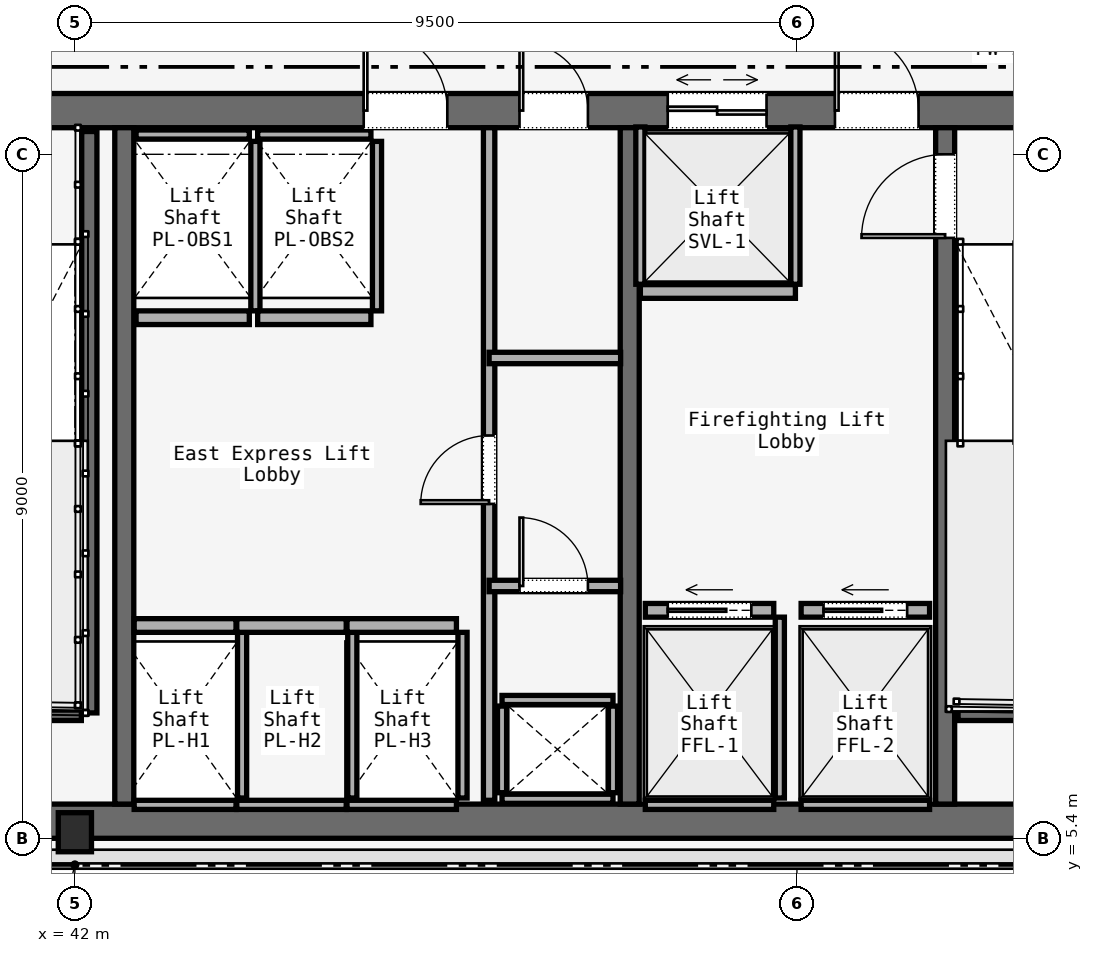
"""IFC4 building model, lengths in metres.
Left out: names, types, materials, properties, quantities, classifications, styles, units other than length and angle.
Written with IfcOpenShell. Run it as: python <this file> out.ifc"""

import sys

from ifc_helpers import new_model, si_unit, direction, frame, frame_2d, origin, origin_2d, place, context, subcontext, project, spatial, rectangle, i_section, extrude, element, fill, save


model = new_model("IFC4")
c1 = context("Model", 3, precision=1e-05, world=origin(), true_north=direction((0.0, 1.0)))
c2 = subcontext(c1, "Body", "Model", "MODEL_VIEW")
j1 = project(units=[si_unit("LENGTHUNIT", "METRE"), si_unit("PLANEANGLEUNIT", "RADIAN")], contexts=[c1])
p1 = place(None, origin())
s1 = spatial("IfcSite", under=j1, at=p1, CompositionType="ELEMENT")
p2 = place(p1, origin())
s2 = spatial("IfcBuilding", under=s1, at=p2, CompositionType="ELEMENT")
p3 = place(p2, frame((0.0, 0.0, 70.2)))
s3 = spatial("IfcBuildingStorey", under=s2, at=p3, CompositionType="ELEMENT", Elevation=70.2)
p4 = place(p3, frame((26.45, 14.975, 0.0), z_axis=(0.0, 0.0, 1.0), x_axis=(1.0, 0.0, 0.0)))
e1 = element("IfcWall", 1, at=p4, inside=s3, PredefinedType="SOLIDWALL", context=c2, shape_type="SweptSolid", body=[
    extrude(rectangle(XDim=31.1, YDim=0.45, at=frame_2d((15.55, 0.0))), origin(), (0.0, 0.0, 1.0), 3.58),
])
p5 = place(p4, frame((1.65, 0.0, 0.0)))
e2 = element("IfcOpeningElement", 2, at=p5, cuts=e1, PredefinedType="OPENING", context=c2, shape_type="SweptSolid", body=[
    extrude(rectangle(XDim=1.1, YDim=2.2, at=frame_2d((0.55, 1.1))), frame((0.0, 0.225, 0.0), z_axis=(0.0, -1.0, 0.0), x_axis=(1.0, 0.0, 0.0)), (0.0, 0.0, 1.0), 0.45),
])
p6 = place(p4, frame((13.65, 0.0, 0.0)))
e3 = element("IfcOpeningElement", 3, at=p6, cuts=e1, PredefinedType="OPENING", context=c2, shape_type="SweptSolid", body=[
    extrude(rectangle(XDim=1.1, YDim=2.2, at=frame_2d((0.55, 1.1))), frame((0.0, 0.225, 0.0), z_axis=(0.0, -1.0, 0.0), x_axis=(1.0, 0.0, 0.0)), (0.0, 0.0, 1.0), 0.45),
])
p7 = place(p4, frame((25.55, 0.0, 0.0)))
e4 = element("IfcOpeningElement", 4, at=p7, cuts=e1, PredefinedType="OPENING", context=c2, shape_type="SweptSolid", body=[
    extrude(rectangle(XDim=1.1, YDim=2.2, at=frame_2d((0.55, 1.1))), frame((0.0, 0.225, 0.0), z_axis=(0.0, -1.0, 0.0), x_axis=(1.0, 0.0, 0.0)), (0.0, 0.0, 1.0), 0.45),
])
p8 = place(p4, frame((10.7, 0.0, 0.0)))
e5 = element("IfcOpeningElement", 5, at=p8, cuts=e1, PredefinedType="OPENING", context=c2, shape_type="SweptSolid", body=[
    extrude(rectangle(XDim=1.4, YDim=2.2, at=frame_2d((0.7, 1.1))), frame((0.0, 0.225, 0.0), z_axis=(0.0, -1.0, 0.0), x_axis=(1.0, 0.0, 0.0)), (0.0, 0.0, 1.0), 0.45),
])
p9 = place(p4, frame((19.35, 0.0, 0.0)))
e6 = element("IfcOpeningElement", 6, at=p9, cuts=e1, PredefinedType="OPENING", context=c2, shape_type="SweptSolid", body=[
    extrude(rectangle(XDim=1.1, YDim=2.2, at=frame_2d((0.55, 1.1))), frame((0.0, 0.225, 0.0), z_axis=(0.0, -1.0, 0.0), x_axis=(1.0, 0.0, 0.0)), (0.0, 0.0, 1.0), 0.45),
])
p10 = place(p4, frame((21.4, 0.0, 0.0)))
e7 = element("IfcOpeningElement", 7, at=p10, cuts=e1, PredefinedType="OPENING", context=c2, shape_type="SweptSolid", body=[
    extrude(rectangle(XDim=0.9, YDim=2.1, at=frame_2d((0.45, 1.05))), frame((0.0, 0.225, 0.0), z_axis=(0.0, -1.0, 0.0), x_axis=(1.0, 0.0, 0.0)), (0.0, 0.0, 1.0), 0.45),
])
p11 = place(p4, frame((23.35, 0.0, 0.0)))
e8 = element("IfcOpeningElement", 8, at=p11, cuts=e1, PredefinedType="OPENING", context=c2, shape_type="SweptSolid", body=[
    extrude(rectangle(XDim=1.3, YDim=2.3, at=frame_2d((0.65, 1.15))), frame((0.0, 0.225, 0.0), z_axis=(0.0, -1.0, 0.0), x_axis=(1.0, 0.0, 0.0)), (0.0, 0.0, 1.0), 0.45),
])
p12 = place(p3, frame((26.45, 5.625, 0.0), z_axis=(0.0, 0.0, 1.0), x_axis=(1.0, 0.0, 0.0)))
e9 = element("IfcWall", 9, at=p12, inside=s3, PredefinedType="SOLIDWALL", context=c2, shape_type="SweptSolid", body=[
    extrude(rectangle(XDim=31.1, YDim=0.45, at=frame_2d((15.55, 0.0))), origin(), (0.0, 0.0, 1.0), 3.58),
])
for number, where, z_axis, x_axis in (
    (10, (42.65, 5.85, 0.0), (0.0, 0.0, 1.0), (0.0, 1.0, 0.0)),
    (11, (49.3, 5.85, 0.0), (0.0, 0.0, 1.0), (0.0, 1.0, 0.0)),
):
    element("IfcWall", number, at=place(p3, frame(where, z_axis=z_axis, x_axis=x_axis)), inside=s3, PredefinedType="SOLIDWALL", context=c2, shape_type="SweptSolid", body=[
        extrude(rectangle(XDim=8.9, YDim=0.25, at=frame_2d((4.45, 0.0))), origin(), (0.0, 0.0, 1.0), 3.58),
    ])
p13 = place(p3, frame((53.45, 5.85, 0.0), z_axis=(0.0, 0.0, 1.0), x_axis=(0.0, 1.0, 0.0)))
e12 = element("IfcWall", 12, at=p13, inside=s3, PredefinedType="SOLIDWALL", context=c2, shape_type="SweptSolid", body=[
    extrude(rectangle(XDim=8.9, YDim=0.25, at=frame_2d((4.45, 0.0))), origin(), (0.0, 0.0, 1.0), 3.58),
])
p14 = place(p13, frame((7.45, 0.0, 0.0)))
e13 = element("IfcOpeningElement", 13, at=p14, cuts=e12, PredefinedType="OPENING", context=c2, shape_type="SweptSolid", body=[
    extrude(rectangle(XDim=1.1, YDim=2.2, at=frame_2d((0.55, 1.1))), frame((0.0, 0.125, 0.0), z_axis=(0.0, -1.0, 0.0), x_axis=(1.0, 0.0, 0.0)), (0.0, 0.0, 1.0), 0.25),
])
p15 = place(p3, frame((42.0, 5.48, 0.0), z_axis=(0.0, 0.0, 1.0), x_axis=(1.0, 0.0, 0.0)))
e14 = element("IfcColumn", 14, at=p15, inside=s3, PredefinedType="COLUMN", context=c2, shape_type="SweptSolid", body=[
    extrude(i_section(OverallWidth=0.437, OverallDepth=0.514, WebThickness=0.061, FlangeThickness=0.077, FilletRadius=0.015, at=origin_2d()), origin(), (0.0, 0.0, 1.0), 3.58),
])
p16 = place(p3, frame((42.19, 14.7, 0.0), z_axis=(0.0, 0.0, 1.0), x_axis=(0.0, -1.0, 0.0)))
e15 = element("IfcWall", 15, at=p16, inside=s3, PredefinedType="SOLIDWALL", context=c2, shape_type="SweptSolid", body=[
    extrude(rectangle(XDim=7.65, YDim=0.2, at=frame_2d((3.825, 0.0))), origin(), (0.0, 0.0, 1.0), 3.8),
])
for number, where, z_axis, x_axis in (
    (16, (38.97, 7.05, 0.0), (0.0, 0.0, 1.0), (1.0, 0.0, 0.0)),
    (17, (53.62, 7.05, 0.0), (0.0, 0.0, 1.0), (1.0, 0.0, 0.0)),
):
    element("IfcWall", number, at=place(p3, frame(where, z_axis=z_axis, x_axis=x_axis)), inside=s3, PredefinedType="SOLIDWALL", context=c2, shape_type="SweptSolid", body=[
        extrude(rectangle(XDim=3.115, YDim=0.2, at=frame_2d((1.558, 0.0))), origin(), (0.0, 0.0, 1.0), 3.8),
    ])
for number, where, z_axis, x_axis in (
    (18, (47.62, 5.92, 0.0), (0.0, 0.0, 1.0), (1.0, 0.0, 0.0)),
    (19, (47.62, 7.22, 0.0), (0.0, 0.0, 1.0), (1.0, 0.0, 0.0)),
):
    element("IfcWall", number, at=place(p3, frame(where, z_axis=z_axis, x_axis=x_axis)), inside=s3, PredefinedType="SOLIDWALL", context=c2, shape_type="SweptSolid", body=[
        extrude(rectangle(XDim=1.46, YDim=0.12, at=frame_2d((0.73, 0.0))), origin(), (0.0, 0.0, 1.0), 2.95),
    ])
for number, where, z_axis, x_axis in (
    (20, (47.62, 6.0, 0.0), (0.0, 0.0, 1.0), (0.0, 1.0, 0.0)),
    (21, (49.08, 6.0, 0.0), (0.0, 0.0, 1.0), (0.0, 1.0, 0.0)),
):
    element("IfcWall", number, at=place(p3, frame(where, z_axis=z_axis, x_axis=x_axis)), inside=s3, PredefinedType="SOLIDWALL", context=c2, shape_type="SweptSolid", body=[
        extrude(rectangle(XDim=1.14, YDim=0.12, at=frame_2d((0.57, 0.0))), origin(), (0.0, 0.0, 1.0), 2.95),
    ])
p17 = place(p3, frame((47.45, 5.9, 0.0), z_axis=(0.0, 0.0, 1.0), x_axis=(0.0, 1.0, 0.0)))
e22 = element("IfcWall", 22, at=p17, inside=s3, PredefinedType="PARTITIONING", context=c2, shape_type="SweptSolid", body=[
    extrude(rectangle(XDim=8.85, YDim=0.15, at=frame_2d((4.425, 0.0))), origin(), (0.0, 0.0, 1.0), 2.95),
])
p18 = place(p17, frame((3.9, 0.0, 0.0)))
e23 = element("IfcOpeningElement", 23, at=p18, cuts=e22, PredefinedType="OPENING", context=c2, shape_type="SweptSolid", body=[
    extrude(rectangle(XDim=0.9, YDim=2.1, at=frame_2d((0.45, 1.05))), frame((0.0, 0.075, 0.0), z_axis=(0.0, -1.0, 0.0), x_axis=(1.0, 0.0, 0.0)), (0.0, 0.0, 1.0), 0.15),
])
p19 = place(p3, frame((47.45, 8.72, 0.0), z_axis=(0.0, 0.0, 1.0), x_axis=(1.0, 0.0, 0.0)))
e24 = element("IfcWall", 24, at=p19, inside=s3, PredefinedType="PARTITIONING", context=c2, shape_type="SweptSolid", body=[
    extrude(rectangle(XDim=1.73, YDim=0.15, at=frame_2d((0.865, 0.0))), origin(), (0.0, 0.0, 1.0), 2.95),
])
p20 = place(p19, frame((0.4, 0.0, 0.0)))
e25 = element("IfcOpeningElement", 25, at=p20, cuts=e24, PredefinedType="OPENING", context=c2, shape_type="SweptSolid", body=[
    extrude(rectangle(XDim=0.9, YDim=2.1, at=frame_2d((0.45, 1.05))), frame((0.0, 0.075, 0.0), z_axis=(0.0, -1.0, 0.0), x_axis=(1.0, 0.0, 0.0)), (0.0, 0.0, 1.0), 0.15),
])
p21 = place(p3, frame((47.45, 11.72, 0.0), z_axis=(0.0, 0.0, 1.0), x_axis=(1.0, 0.0, 0.0)))
e26 = element("IfcWall", 26, at=p21, inside=s3, PredefinedType="PARTITIONING", context=c2, shape_type="SweptSolid", body=[
    extrude(rectangle(XDim=1.73, YDim=0.15, at=frame_2d((0.865, 0.0))), origin(), (0.0, 0.0, 1.0), 2.95),
])
p22 = place(p3, frame((42.78, 8.2, 0.0), z_axis=(0.0, 0.0, 1.0), x_axis=(1.0, 0.0, 0.0)))
e27 = element("IfcWall", 27, at=p22, inside=s3, PredefinedType="SOLIDWALL", context=c2, shape_type="SweptSolid", body=[
    extrude(rectangle(XDim=1.34, YDim=0.18, at=frame_2d((0.67, 0.0))), origin(), (0.0, 0.0, 1.0), 2.95),
])
p23 = place(p3, frame((42.78, 5.84, 0.0), z_axis=(0.0, 0.0, 1.0), x_axis=(1.0, 0.0, 0.0)))
e28 = element("IfcWall", 28, at=p23, inside=s3, PredefinedType="SOLIDWALL", context=c2, shape_type="SweptSolid", body=[
    extrude(rectangle(XDim=1.34, YDim=0.12, at=frame_2d((0.67, 0.0))), origin(), (0.0, 0.0, 1.0), 2.95),
])
p24 = place(p3, frame((44.2, 5.93, 0.0), z_axis=(0.0, 0.0, 1.0), x_axis=(0.0, 1.0, 0.0)))
e29 = element("IfcWall", 29, at=p24, inside=s3, PredefinedType="SOLIDWALL", context=c2, shape_type="SweptSolid", body=[
    extrude(rectangle(XDim=2.18, YDim=0.12, at=frame_2d((1.09, 0.0))), origin(), (0.0, 0.0, 1.0), 2.95),
])
p25 = place(p3, frame((44.13, 8.2, 0.0), z_axis=(0.0, 0.0, 1.0), x_axis=(1.0, 0.0, 0.0)))
e30 = element("IfcWall", 30, at=p25, inside=s3, PredefinedType="SOLIDWALL", context=c2, shape_type="SweptSolid", body=[
    extrude(rectangle(XDim=1.44, YDim=0.18, at=frame_2d((0.72, 0.0))), origin(), (0.0, 0.0, 1.0), 2.95),
])
p26 = place(p3, frame((44.13, 5.84, 0.0), z_axis=(0.0, 0.0, 1.0), x_axis=(1.0, 0.0, 0.0)))
e31 = element("IfcWall", 31, at=p26, inside=s3, PredefinedType="SOLIDWALL", context=c2, shape_type="SweptSolid", body=[
    extrude(rectangle(XDim=1.44, YDim=0.12, at=frame_2d((0.72, 0.0))), origin(), (0.0, 0.0, 1.0), 2.95),
])
p27 = place(p3, frame((45.65, 5.93, 0.0), z_axis=(0.0, 0.0, 1.0), x_axis=(0.0, 1.0, 0.0)))
e32 = element("IfcWall", 32, at=p27, inside=s3, PredefinedType="SOLIDWALL", context=c2, shape_type="SweptSolid", body=[
    extrude(rectangle(XDim=2.18, YDim=0.12, at=frame_2d((1.09, 0.0))), origin(), (0.0, 0.0, 1.0), 2.95),
])
p28 = place(p3, frame((45.58, 8.2, 0.0), z_axis=(0.0, 0.0, 1.0), x_axis=(1.0, 0.0, 0.0)))
e33 = element("IfcWall", 33, at=p28, inside=s3, PredefinedType="SOLIDWALL", context=c2, shape_type="SweptSolid", body=[
    extrude(rectangle(XDim=1.44, YDim=0.18, at=frame_2d((0.72, 0.0))), origin(), (0.0, 0.0, 1.0), 2.95),
])
p29 = place(p3, frame((45.58, 5.84, 0.0), z_axis=(0.0, 0.0, 1.0), x_axis=(1.0, 0.0, 0.0)))
e34 = element("IfcWall", 34, at=p29, inside=s3, PredefinedType="SOLIDWALL", context=c2, shape_type="SweptSolid", body=[
    extrude(rectangle(XDim=1.44, YDim=0.12, at=frame_2d((0.72, 0.0))), origin(), (0.0, 0.0, 1.0), 2.95),
])
p30 = place(p3, frame((47.1, 5.93, 0.0), z_axis=(0.0, 0.0, 1.0), x_axis=(0.0, 1.0, 0.0)))
e35 = element("IfcWall", 35, at=p30, inside=s3, PredefinedType="SOLIDWALL", context=c2, shape_type="SweptSolid", body=[
    extrude(rectangle(XDim=2.18, YDim=0.12, at=frame_2d((1.09, 0.0))), origin(), (0.0, 0.0, 1.0), 2.95),
])
p31 = place(p3, frame((42.805, 12.25, 0.0), z_axis=(0.0, 0.0, 1.0), x_axis=(1.0, 0.0, 0.0)))
e36 = element("IfcWall", 36, at=p31, inside=s3, PredefinedType="SOLIDWALL", context=c2, shape_type="SweptSolid", body=[
    extrude(rectangle(XDim=1.49, YDim=0.18, at=frame_2d((0.745, 0.0))), origin(), (0.0, 0.0, 1.0), 2.95),
])
p32 = place(p3, frame((42.805, 14.66, 0.0), z_axis=(0.0, 0.0, 1.0), x_axis=(1.0, 0.0, 0.0)))
e37 = element("IfcWall", 37, at=p32, inside=s3, PredefinedType="SOLIDWALL", context=c2, shape_type="SweptSolid", body=[
    extrude(rectangle(XDim=1.49, YDim=0.12, at=frame_2d((0.745, 0.0))), origin(), (0.0, 0.0, 1.0), 2.95),
])
p33 = place(p3, frame((44.375, 12.34, 0.0), z_axis=(0.0, 0.0, 1.0), x_axis=(0.0, 1.0, 0.0)))
e38 = element("IfcWall", 38, at=p33, inside=s3, PredefinedType="SOLIDWALL", context=c2, shape_type="SweptSolid", body=[
    extrude(rectangle(XDim=2.23, YDim=0.12, at=frame_2d((1.115, 0.0))), origin(), (0.0, 0.0, 1.0), 2.95),
])
p34 = place(p3, frame((44.405, 12.25, 0.0), z_axis=(0.0, 0.0, 1.0), x_axis=(1.0, 0.0, 0.0)))
e39 = element("IfcWall", 39, at=p34, inside=s3, PredefinedType="SOLIDWALL", context=c2, shape_type="SweptSolid", body=[
    extrude(rectangle(XDim=1.49, YDim=0.18, at=frame_2d((0.745, 0.0))), origin(), (0.0, 0.0, 1.0), 2.95),
])
p35 = place(p3, frame((44.405, 14.66, 0.0), z_axis=(0.0, 0.0, 1.0), x_axis=(1.0, 0.0, 0.0)))
e40 = element("IfcWall", 40, at=p35, inside=s3, PredefinedType="SOLIDWALL", context=c2, shape_type="SweptSolid", body=[
    extrude(rectangle(XDim=1.49, YDim=0.12, at=frame_2d((0.745, 0.0))), origin(), (0.0, 0.0, 1.0), 2.95),
])
p36 = place(p3, frame((45.975, 12.34, 0.0), z_axis=(0.0, 0.0, 1.0), x_axis=(0.0, 1.0, 0.0)))
e41 = element("IfcWall", 41, at=p36, inside=s3, PredefinedType="SOLIDWALL", context=c2, shape_type="SweptSolid", body=[
    extrude(rectangle(XDim=2.23, YDim=0.12, at=frame_2d((1.115, 0.0))), origin(), (0.0, 0.0, 1.0), 2.95),
])
p37 = place(p3, frame((49.505, 8.4, 0.0), z_axis=(0.0, 0.0, 1.0), x_axis=(1.0, 0.0, 0.0)))
e42 = element("IfcWall", 42, at=p37, inside=s3, PredefinedType="SOLIDWALL", context=c2, shape_type="SweptSolid", body=[
    extrude(rectangle(XDim=1.69, YDim=0.18, at=frame_2d((0.845, 0.0))), origin(), (0.0, 0.0, 1.0), 2.95),
])
p38 = place(p37, frame((0.295, 0.0, 0.0)))
e43 = element("IfcOpeningElement", 43, at=p38, cuts=e42, PredefinedType="OPENING", context=c2, shape_type="SweptSolid", body=[
    extrude(rectangle(XDim=1.1, YDim=2.2, at=frame_2d((0.55, 1.1))), frame((0.0, 0.09, 0.0), z_axis=(0.0, -1.0, 0.0), x_axis=(1.0, 0.0, 0.0)), (0.0, 0.0, 1.0), 0.18),
])
p39 = place(p3, frame((49.505, 5.84, 0.0), z_axis=(0.0, 0.0, 1.0), x_axis=(1.0, 0.0, 0.0)))
e44 = element("IfcWall", 44, at=p39, inside=s3, PredefinedType="SOLIDWALL", context=c2, shape_type="SweptSolid", body=[
    extrude(rectangle(XDim=1.69, YDim=0.12, at=frame_2d((0.845, 0.0))), origin(), (0.0, 0.0, 1.0), 2.95),
])
p40 = place(p3, frame((51.275, 5.93, 0.0), z_axis=(0.0, 0.0, 1.0), x_axis=(0.0, 1.0, 0.0)))
e45 = element("IfcWall", 45, at=p40, inside=s3, PredefinedType="SOLIDWALL", context=c2, shape_type="SweptSolid", body=[
    extrude(rectangle(XDim=2.38, YDim=0.12, at=frame_2d((1.19, 0.0))), origin(), (0.0, 0.0, 1.0), 2.95),
])
p41 = place(p3, frame((51.555, 8.4, 0.0), z_axis=(0.0, 0.0, 1.0), x_axis=(1.0, 0.0, 0.0)))
e46 = element("IfcWall", 46, at=p41, inside=s3, PredefinedType="SOLIDWALL", context=c2, shape_type="SweptSolid", body=[
    extrude(rectangle(XDim=1.69, YDim=0.18, at=frame_2d((0.845, 0.0))), origin(), (0.0, 0.0, 1.0), 2.95),
])
p42 = place(p41, frame((0.295, 0.0, 0.0)))
e47 = element("IfcOpeningElement", 47, at=p42, cuts=e46, PredefinedType="OPENING", context=c2, shape_type="SweptSolid", body=[
    extrude(rectangle(XDim=1.1, YDim=2.2, at=frame_2d((0.55, 1.1))), frame((0.0, 0.09, 0.0), z_axis=(0.0, -1.0, 0.0), x_axis=(1.0, 0.0, 0.0)), (0.0, 0.0, 1.0), 0.18),
])
p43 = place(p3, frame((51.555, 5.84, 0.0), z_axis=(0.0, 0.0, 1.0), x_axis=(1.0, 0.0, 0.0)))
e48 = element("IfcWall", 48, at=p43, inside=s3, PredefinedType="SOLIDWALL", context=c2, shape_type="SweptSolid", body=[
    extrude(rectangle(XDim=1.69, YDim=0.12, at=frame_2d((0.845, 0.0))), origin(), (0.0, 0.0, 1.0), 2.95),
])
p44 = place(p3, frame((49.44, 12.595, 0.0), z_axis=(0.0, 0.0, 1.0), x_axis=(1.0, 0.0, 0.0)))
e49 = element("IfcWall", 49, at=p44, inside=s3, PredefinedType="SOLIDWALL", context=c2, shape_type="SweptSolid", body=[
    extrude(rectangle(XDim=2.04, YDim=0.18, at=frame_2d((1.02, 0.0))), origin(), (0.0, 0.0, 1.0), 2.95),
])
for number, where, z_axis, x_axis in (
    (50, (49.44, 12.69, 0.0), (0.0, 0.0, 1.0), (0.0, 1.0, 0.0)),
    (51, (51.48, 12.69, 0.0), (0.0, 0.0, 1.0), (0.0, 1.0, 0.0)),
):
    element("IfcWall", number, at=place(p3, frame(where, z_axis=z_axis, x_axis=x_axis)), inside=s3, PredefinedType="SOLIDWALL", context=c2, shape_type="SweptSolid", body=[
        extrude(rectangle(XDim=2.07, YDim=0.12, at=frame_2d((1.035, 0.0))), origin(), (0.0, 0.0, 1.0), 2.95),
    ])
p45 = place(p7, origin())
e52 = element("IfcDoor", 52, at=p45, inside=s3, OperationType="SINGLE_SWING_RIGHT", PredefinedType="DOOR", context=c2, shape_type="SweptSolid", body=[
    extrude(rectangle(XDim=1.1, YDim=2.2, at=frame_2d((0.55, 1.1))), frame((0.0, 0.025, 0.0), z_axis=(0.0, -1.0, 0.0), x_axis=(1.0, 0.0, 0.0)), (0.0, 0.0, 1.0), 0.05),
])
fill(e4, e52)
p46 = place(p9, origin())
e53 = element("IfcDoor", 53, at=p46, inside=s3, OperationType="SINGLE_SWING_LEFT", PredefinedType="DOOR", context=c2, shape_type="SweptSolid", body=[
    extrude(rectangle(XDim=1.1, YDim=2.2, at=frame_2d((0.55, 1.1))), frame((0.0, 0.025, 0.0), z_axis=(0.0, -1.0, 0.0), x_axis=(1.0, 0.0, 0.0)), (0.0, 0.0, 1.0), 0.05),
])
fill(e6, e53)
p47 = place(p10, origin())
e54 = element("IfcDoor", 54, at=p47, inside=s3, OperationType="SINGLE_SWING_LEFT", PredefinedType="DOOR", context=c2, shape_type="SweptSolid", body=[
    extrude(rectangle(XDim=0.9, YDim=2.1, at=frame_2d((0.45, 1.05))), frame((0.0, 0.025, 0.0), z_axis=(0.0, -1.0, 0.0), x_axis=(1.0, 0.0, 0.0)), (0.0, 0.0, 1.0), 0.05),
])
fill(e7, e54)
p48 = place(p14, origin())
e55 = element("IfcDoor", 55, at=p48, inside=s3, OperationType="SINGLE_SWING_LEFT", PredefinedType="DOOR", context=c2, shape_type="SweptSolid", body=[
    extrude(rectangle(XDim=1.1, YDim=2.2, at=frame_2d((0.55, 1.1))), frame((0.0, 0.025, 0.0), z_axis=(0.0, -1.0, 0.0), x_axis=(1.0, 0.0, 0.0)), (0.0, 0.0, 1.0), 0.05),
])
fill(e13, e55)
p49 = place(p18, origin())
e56 = element("IfcDoor", 56, at=p49, inside=s3, OperationType="SINGLE_SWING_LEFT", PredefinedType="DOOR", context=c2, shape_type="SweptSolid", body=[
    extrude(rectangle(XDim=0.9, YDim=2.1, at=frame_2d((0.45, 1.05))), frame((0.0, 0.025, 0.0), z_axis=(0.0, -1.0, 0.0), x_axis=(1.0, 0.0, 0.0)), (0.0, 0.0, 1.0), 0.05),
])
fill(e23, e56)
p50 = place(p20, origin())
e57 = element("IfcDoor", 57, at=p50, inside=s3, OperationType="SINGLE_SWING_RIGHT", PredefinedType="DOOR", context=c2, shape_type="SweptSolid", body=[
    extrude(rectangle(XDim=0.9, YDim=2.1, at=frame_2d((0.45, 1.05))), frame((0.0, 0.025, 0.0), z_axis=(0.0, -1.0, 0.0), x_axis=(1.0, 0.0, 0.0)), (0.0, 0.0, 1.0), 0.05),
])
fill(e25, e57)
p51 = place(p38, origin())
e58 = element("IfcDoor", 58, at=p51, inside=s3, OperationType="SLIDING_TO_LEFT", PredefinedType="DOOR", context=c2, shape_type="SweptSolid", body=[
    extrude(rectangle(XDim=1.1, YDim=2.2, at=frame_2d((0.55, 1.1))), frame((0.0, 0.025, 0.0), z_axis=(0.0, -1.0, 0.0), x_axis=(1.0, 0.0, 0.0)), (0.0, 0.0, 1.0), 0.05),
])
fill(e43, e58)
p52 = place(p42, origin())
e59 = element("IfcDoor", 59, at=p52, inside=s3, OperationType="SLIDING_TO_LEFT", PredefinedType="DOOR", context=c2, shape_type="SweptSolid", body=[
    extrude(rectangle(XDim=1.1, YDim=2.2, at=frame_2d((0.55, 1.1))), frame((0.0, 0.025, 0.0), z_axis=(0.0, -1.0, 0.0), x_axis=(1.0, 0.0, 0.0)), (0.0, 0.0, 1.0), 0.05),
])
fill(e47, e59)
p53 = place(p11, origin())
e60 = element("IfcDoor", 60, at=p53, inside=s3, OperationType="DOUBLE_DOOR_SLIDING", PredefinedType="DOOR", context=c2, shape_type="SweptSolid", body=[
    extrude(rectangle(XDim=1.3, YDim=2.3, at=frame_2d((0.65, 1.15))), frame((0.0, 0.025, 0.0), z_axis=(0.0, -1.0, 0.0), x_axis=(1.0, 0.0, 0.0)), (0.0, 0.0, 1.0), 0.05),
])
fill(e8, e60)
save(model, sys.argv[1])
